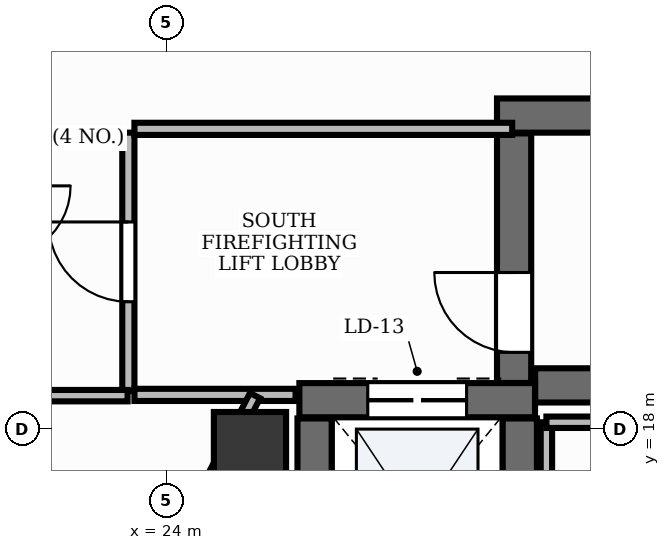
"""IFC4 building model, lengths in metres.
Left out: names, types, materials, properties, quantities, classifications, styles, units other than length and angle.
Written with IfcOpenShell. Run it as: python <this file> out.ifc"""

import sys

from ifc_helpers import new_model, si_unit, direction, frame, frame_2d, origin, origin_2d, place, context, subcontext, project, spatial, rectangle, extrude, element, fill, save


model = new_model("IFC4")
c1 = context("Model", 3, precision=1e-05, world=origin(), true_north=direction((0.0, 1.0)))
c2 = subcontext(c1, "Body", "Model", "MODEL_VIEW")
j1 = project(units=[si_unit("LENGTHUNIT", "METRE"), si_unit("PLANEANGLEUNIT", "RADIAN")], contexts=[c1])
p1 = place(None, origin())
s1 = spatial("IfcSite", under=j1, at=p1, CompositionType="ELEMENT")
p2 = place(p1, origin())
s2 = spatial("IfcBuilding", under=s1, at=p2, CompositionType="ELEMENT")
p3 = place(p2, frame((0.0, 0.0, 136.2)))
s3 = spatial("IfcBuildingStorey", under=s2, at=p3, CompositionType="ELEMENT", Elevation=136.2)
p4 = place(p3, frame((28.852, 18.575, 0.0), z_axis=(0.0, 0.0, 1.0), x_axis=(1.0, 0.0, 0.0)))
e1 = element("IfcWall", 1, at=p4, inside=s3, PredefinedType="SHEAR", context=c2, shape_type="SweptSolid", body=[
    extrude(rectangle(XDim=8.248, YDim=0.45, at=frame_2d((4.124, 0.0))), origin(), (0.0, 0.0, 1.0), 3.9),
])
p5 = place(p3, frame((28.35, 22.125, 0.0), z_axis=(0.0, 0.0, 1.0), x_axis=(1.0, 0.0, 0.0)))
e2 = element("IfcWall", 2, at=p5, inside=s3, PredefinedType="SHEAR", context=c2, shape_type="SweptSolid", body=[
    extrude(rectangle(XDim=8.75, YDim=0.45, at=frame_2d((4.375, 0.0))), origin(), (0.0, 0.0, 1.0), 3.9),
])
p6 = place(p3, frame((28.575, 18.607, 0.0), z_axis=(0.0, 0.0, 1.0), x_axis=(0.0, 1.0, 0.0)))
e3 = element("IfcWall", 3, at=p6, inside=s3, PredefinedType="SHEAR", context=c2, shape_type="SweptSolid", body=[
    extrude(rectangle(XDim=3.283, YDim=0.45, at=frame_2d((1.642, 0.0))), origin(), (0.0, 0.0, 1.0), 3.9),
])
p7 = place(p6, frame((0.403, 0.0, 0.0)))
e4 = element("IfcOpeningElement", 4, at=p7, cuts=e3, PredefinedType="OPENING", context=c2, shape_type="SweptSolid", body=[
    extrude(rectangle(XDim=1.05, YDim=2.15, at=frame_2d((0.525, 1.075))), frame((0.0, 0.24, 0.0), z_axis=(0.0, -1.0, 0.0), x_axis=(1.0, 0.0, 0.0)), (0.0, 0.0, 1.0), 0.48),
])
p8 = place(p3, frame((25.75, 18.38, 0.0), z_axis=(0.0, 0.0, 1.0), x_axis=(1.0, 0.0, 0.0)))
e5 = element("IfcWall", 5, at=p8, inside=s3, PredefinedType="SHEAR", context=c2, shape_type="SweptSolid", body=[
    extrude(rectangle(XDim=3.1, YDim=0.45, at=frame_2d((1.55, 0.0))), origin(), (0.0, 0.0, 1.0), 3.9),
])
p9 = place(p8, frame((0.9, 0.0, 0.0)))
e6 = element("IfcOpeningElement", 6, at=p9, cuts=e5, PredefinedType="OPENING", context=c2, shape_type="SweptSolid", body=[
    extrude(rectangle(XDim=1.3, YDim=2.2, at=frame_2d((0.65, 1.1))), frame((0.0, 0.24, 0.0), z_axis=(0.0, -1.0, 0.0), x_axis=(1.0, 0.0, 0.0)), (0.0, 0.0, 1.0), 0.48),
])
for number, where, z_axis, x_axis in (
    (7, (25.95, 15.44, 0.0), (0.0, 0.0, 1.0), (0.0, 1.0, 0.0)),
    (8, (28.65, 15.44, 0.0), (0.0, 0.0, 1.0), (0.0, 1.0, 0.0)),
):
    element("IfcWall", number, at=place(p3, frame(where, z_axis=z_axis, x_axis=x_axis)), inside=s3, PredefinedType="SHEAR", context=c2, shape_type="SweptSolid", body=[
        extrude(rectangle(XDim=2.7, YDim=0.45, at=frame_2d((1.35, 0.0))), origin(), (0.0, 0.0, 1.0), 3.9),
    ])
p10 = place(p3, frame((25.1, 17.75, -0.0), z_axis=(0.0, 0.0, 1.0), x_axis=(1.0, 0.0, 0.0)))
e9 = element("IfcColumn", 9, at=p10, inside=s3, PredefinedType="PILASTER", context=c2, shape_type="SweptSolid", body=[
    extrude(rectangle(XDim=0.95, YDim=0.95, at=origin_2d()), origin(), (0.0, 0.0, 1.0), 3.901),
])
p11 = place(p3, frame((23.5, 18.5, 0.0), z_axis=(0.0, 0.0, 1.0), x_axis=(0.0, 1.0, 0.0)))
e10 = element("IfcWall", 10, at=p11, inside=s3, PredefinedType="PARTITIONING", context=c2, shape_type="SweptSolid", body=[
    extrude(rectangle(XDim=3.4, YDim=0.16, at=frame_2d((1.7, 0.0))), origin(), (0.0, 0.0, 1.0), 2.91),
])
p12 = place(p11, frame((1.175, 0.0, 0.0)))
e11 = element("IfcOpeningElement", 11, at=p12, cuts=e10, PredefinedType="OPENING", context=c2, shape_type="SweptSolid", body=[
    extrude(rectangle(XDim=1.05, YDim=2.15, at=frame_2d((0.525, 1.075))), frame((0.0, 0.095, 0.0), z_axis=(0.0, -1.0, 0.0), x_axis=(1.0, 0.0, 0.0)), (0.0, 0.0, 1.0), 0.19),
])
p13 = place(p3, frame((23.58, 21.95, 0.0), z_axis=(0.0, 0.0, 1.0), x_axis=(1.0, 0.0, 0.0)))
e12 = element("IfcWall", 12, at=p13, inside=s3, PredefinedType="PARTITIONING", context=c2, shape_type="SweptSolid", body=[
    extrude(rectangle(XDim=4.97, YDim=0.16, at=frame_2d((2.485, 0.0))), origin(), (0.0, 0.0, 1.0), 2.91),
])
p14 = place(p3, frame((23.58, 18.45, 0.0), z_axis=(0.0, 0.0, 1.0), x_axis=(1.0, 0.0, 0.0)))
e13 = element("IfcWall", 13, at=p14, inside=s3, PredefinedType="PARTITIONING", context=c2, shape_type="SweptSolid", body=[
    extrude(rectangle(XDim=2.12, YDim=0.16, at=frame_2d((1.06, 0.0))), origin(), (0.0, 0.0, 1.0), 2.91),
])
p15 = place(p3, frame((21.8, 18.44, 0.0), z_axis=(0.0, 0.0, 1.0), x_axis=(1.0, 0.0, 0.0)))
e14 = element("IfcWall", 14, at=p15, inside=s3, PredefinedType="PARTITIONING", context=c2, shape_type="SweptSolid", body=[
    extrude(rectangle(XDim=1.69, YDim=0.15, at=frame_2d((0.845, 0.0))), origin(), (0.0, 0.0, 1.0), 2.91),
])
p16 = place(p3, frame((25.167, 18.44, 0.0), z_axis=(0.0, 0.0, 1.0), x_axis=(-0.460256510946, -0.887785978788, 0.0)))
e15 = element("IfcWall", 15, at=p16, inside=s3, PredefinedType="PARTITIONING", context=c2, shape_type="SweptSolid", body=[
    extrude(rectangle(XDim=2.35, YDim=0.15, at=frame_2d((1.175, 0.0))), origin(), (0.0, 0.0, 1.0), 2.91),
])
p17 = place(p3, frame((29.0, 16.352, 0.0), z_axis=(0.0, 0.0, 1.0), x_axis=(0.0, 1.0, 0.0)))
e16 = element("IfcWall", 16, at=p17, inside=s3, PredefinedType="PARTITIONING", context=c2, shape_type="SweptSolid", body=[
    extrude(rectangle(XDim=1.738, YDim=0.15, at=frame_2d((0.869, 0.0))), origin(), (0.0, 0.0, 1.0), 2.91),
])
p18 = place(p3, frame((29.0, 18.09, 0.0), z_axis=(0.0, 0.0, 1.0), x_axis=(1.0, 0.0, 0.0)))
e17 = element("IfcWall", 17, at=p18, inside=s3, PredefinedType="PARTITIONING", context=c2, shape_type="SweptSolid", body=[
    extrude(rectangle(XDim=8.35, YDim=0.15, at=frame_2d((4.175, 0.0))), origin(), (0.0, 0.0, 1.0), 2.91),
])
p19 = place(p7, origin())
e18 = element("IfcDoor", 18, at=p19, inside=s3, OperationType="SINGLE_SWING_RIGHT", PredefinedType="DOOR", context=c2, shape_type="SweptSolid", body=[
    extrude(rectangle(XDim=1.05, YDim=2.15, at=frame_2d((0.525, 1.075))), frame((0.0, 0.025, 0.0), z_axis=(0.0, -1.0, 0.0), x_axis=(1.0, 0.0, 0.0)), (0.0, 0.0, 1.0), 0.05),
])
fill(e4, e18)
p20 = place(p9, origin())
e19 = element("IfcDoor", 19, at=p20, inside=s3, OperationType="DOUBLE_DOOR_SLIDING", PredefinedType="DOOR", context=c2, shape_type="SweptSolid", body=[
    extrude(rectangle(XDim=1.3, YDim=2.2, at=frame_2d((0.65, 1.1))), frame((0.0, 0.025, 0.0), z_axis=(0.0, -1.0, 0.0), x_axis=(1.0, 0.0, 0.0)), (0.0, 0.0, 1.0), 0.05),
])
fill(e6, e19)
p21 = place(p12, origin())
e20 = element("IfcDoor", 20, at=p21, inside=s3, OperationType="SINGLE_SWING_RIGHT", PredefinedType="DOOR", context=c2, shape_type="SweptSolid", body=[
    extrude(rectangle(XDim=1.05, YDim=2.15, at=frame_2d((0.525, 1.075))), frame((0.0, 0.025, 0.0), z_axis=(0.0, -1.0, 0.0), x_axis=(1.0, 0.0, 0.0)), (0.0, 0.0, 1.0), 0.05),
])
fill(e11, e20)
save(model, sys.argv[1])
